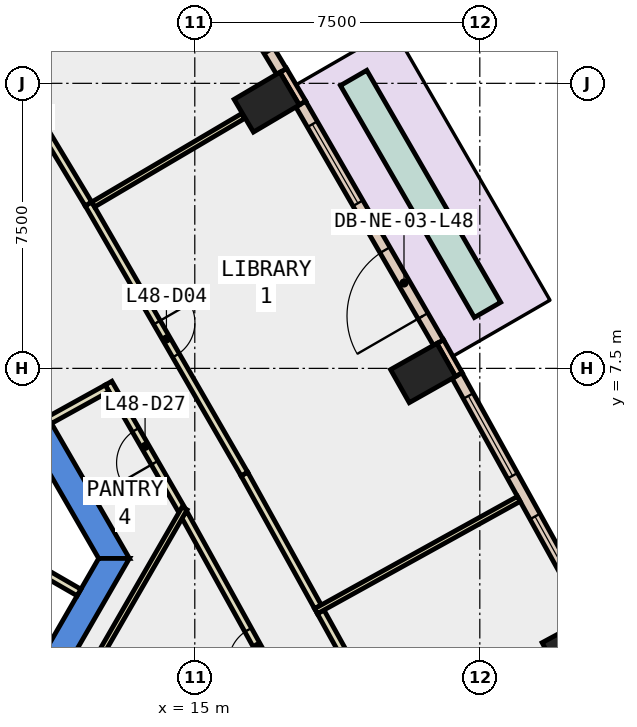
"""IFC4 building model, lengths in metres.
Left out: names, types, materials, properties, quantities, classifications, styles, units other than length and angle.
Written with IfcOpenShell. Run it as: python <this file> out.ifc"""

import sys

from ifc_helpers import new_model, si_unit, direction, frame, frame_2d, origin, origin_2d, place, context, subcontext, project, spatial, polyline, rectangle, outline, extrude, element, fill, save


model = new_model("IFC4")
c1 = context("Model", 3, precision=1e-05, world=origin(), true_north=direction((0.0, 1.0)))
c2 = subcontext(c1, "Body", "Model", "MODEL_VIEW")
j1 = project(units=[si_unit("LENGTHUNIT", "METRE"), si_unit("PLANEANGLEUNIT", "RADIAN")], contexts=[c1])
p1 = place(None, origin())
s1 = spatial("IfcSite", under=j1, at=p1, CompositionType="ELEMENT")
p2 = place(p1, origin())
s2 = spatial("IfcBuilding", under=s1, at=p2, CompositionType="ELEMENT")
p3 = place(p2, frame((0.0, 0.0, 215.0)))
s3 = spatial("IfcBuildingStorey", under=s2, at=p3, CompositionType="ELEMENT", Elevation=215.0)
for number, where, z_axis, x_axis in (
    (1, (24.993, 0.175, -0.4), (0.0, 0.0, 1.0), (-0.474, 0.88, 0.0)),
    (2, (21.007, 7.377, -0.4), (0.0, 0.0, 1.0), (-0.491, 0.871, 0.0)),
    (3, (16.892, 14.504, -0.4), (0.0, 0.0, 1.0), (-0.509, 0.861, 0.0)),
):
    element("IfcColumn", number, at=place(p3, frame(where, z_axis=z_axis, x_axis=x_axis)), inside=s3, PredefinedType="COLUMN", context=c2, shape_type="SweptSolid", body=[
        extrude(rectangle(XDim=1.0, YDim=1.4, at=origin_2d()), origin(), (0.0, 0.0, 1.0), 4.2),
    ])
p4 = place(p3, frame((0.0, 0.0, -0.4)))
e4 = element("IfcWall", 4, at=p4, inside=s3, PredefinedType="SHEAR", context=c2, shape_type="SweptSolid", body=[
    extrude(outline(polyline([(8.084, 11.498), (7.478, 11.148), (12.471, 2.5), (13.279, 2.5), (8.084, 11.498)])), origin(), (0.0, 0.0, 1.0), 4.2),
])
p5 = place(p3, frame((0.0, 0.0, -0.4)))
e5 = element("IfcWall", 5, at=p5, inside=s3, PredefinedType="SHEAR", context=c2, shape_type="SweptSolid", body=[
    extrude(outline(polyline([(6.64, -9.0), (13.279, 2.5), (12.471, 2.5), (6.235, -8.3), (6.64, -9.0)])), origin(), (0.0, 0.0, 1.0), 4.2),
])
p6 = place(p3, frame((21.95, 7.334, 0.0), z_axis=(0.0, 0.0, 1.0), x_axis=(-0.491743606947, 0.87074004446, 0.0)))
e6 = element("IfcWall", 6, at=p6, inside=s3, PredefinedType="STANDARD", context=c2, shape_type="SweptSolid", body=[
    extrude(rectangle(XDim=1.0, YDim=0.2, at=frame_2d((0.5, 0.0))), origin(), (0.0, 0.0, 1.0), 3.8),
])
p7 = place(p3, frame((17.835, 14.481, 0.0), z_axis=(0.0, 0.0, 1.0), x_axis=(-0.508161541526, 0.861261776531, 0.0)))
e7 = element("IfcWall", 7, at=p7, inside=s3, PredefinedType="STANDARD", context=c2, shape_type="SweptSolid", body=[
    extrude(rectangle(XDim=1.0, YDim=0.2, at=frame_2d((0.5, 0.0))), origin(), (0.0, 0.0, 1.0), 3.8),
])
p8 = place(p3, frame((25.411, 0.968, 0.0), z_axis=(0.0, 0.0, 1.0), x_axis=(-0.484163461668, 0.87497756679, 0.0)))
e8 = element("IfcWall", 8, at=p8, inside=s3, PredefinedType="STANDARD", context=c2, shape_type="SweptSolid", body=[
    extrude(rectangle(XDim=7.247, YDim=0.3, at=frame_2d((3.624, 0.0))), origin(), (0.0, 0.0, 1.0), 3.8),
])
p9 = place(p8, frame((0.612, 0.0, 0.9)))
e9 = element("IfcOpeningElement", 9, at=p9, cuts=e8, PredefinedType="OPENING", context=c2, shape_type="SweptSolid", body=[
    extrude(rectangle(XDim=2.4, YDim=2.6, at=frame_2d((1.2, 1.3))), frame((0.0, 0.16, 0.0), z_axis=(0.0, -1.0, 0.0), x_axis=(1.0, 0.0, 0.0)), (0.0, 0.0, 1.0), 0.32),
])
p10 = place(p8, frame((4.235, 0.0, 0.9)))
e10 = element("IfcOpeningElement", 10, at=p10, cuts=e8, PredefinedType="OPENING", context=c2, shape_type="SweptSolid", body=[
    extrude(rectangle(XDim=2.4, YDim=2.6, at=frame_2d((1.2, 1.3))), frame((0.0, 0.16, 0.0), z_axis=(0.0, -1.0, 0.0), x_axis=(1.0, 0.0, 0.0)), (0.0, 0.0, 1.0), 0.32),
])
p11 = place(p3, frame((21.411, 8.177, 0.0), z_axis=(0.0, 0.0, 1.0), x_axis=(-0.499968351115, 0.866043675505, 0.0)))
e11 = element("IfcWall", 11, at=p11, inside=s3, PredefinedType="STANDARD", context=c2, shape_type="SweptSolid", body=[
    extrude(rectangle(XDim=7.248, YDim=0.3, at=frame_2d((3.624, 0.0))), origin(), (0.0, 0.0, 1.0), 3.8),
])
p12 = place(p11, frame((0.812, 0.0, 0.0)))
e12 = element("IfcOpeningElement", 12, at=p12, cuts=e11, PredefinedType="OPENING", context=c2, shape_type="SweptSolid", body=[
    extrude(rectangle(XDim=2.0, YDim=2.4, at=frame_2d((1.0, 1.2))), frame((0.0, 0.16, 0.0), z_axis=(0.0, -1.0, 0.0), x_axis=(1.0, 0.0, 0.0)), (0.0, 0.0, 1.0), 0.32),
])
p13 = place(p11, frame((4.236, 0.0, 0.9)))
e13 = element("IfcOpeningElement", 13, at=p13, cuts=e11, PredefinedType="OPENING", context=c2, shape_type="SweptSolid", body=[
    extrude(rectangle(XDim=2.4, YDim=2.6, at=frame_2d((1.2, 1.3))), frame((0.0, 0.16, 0.0), z_axis=(0.0, -1.0, 0.0), x_axis=(1.0, 0.0, 0.0)), (0.0, 0.0, 1.0), 0.32),
])
p14 = place(p3, frame((17.281, 15.313, 0.0), z_axis=(0.0, 0.0, 1.0), x_axis=(-0.515560283412, 0.856853309597, 0.0)))
e14 = element("IfcWall", 14, at=p14, inside=s3, PredefinedType="STANDARD", context=c2, shape_type="SweptSolid", body=[
    extrude(rectangle(XDim=7.249, YDim=0.3, at=frame_2d((3.624, 0.0))), origin(), (0.0, 0.0, 1.0), 3.8),
])
p15 = place(p14, frame((0.612, 0.0, 0.9)))
e15 = element("IfcOpeningElement", 15, at=p15, cuts=e14, PredefinedType="OPENING", context=c2, shape_type="SweptSolid", body=[
    extrude(rectangle(XDim=2.4, YDim=2.6, at=frame_2d((1.2, 1.3))), frame((0.0, 0.16, 0.0), z_axis=(0.0, -1.0, 0.0), x_axis=(1.0, 0.0, 0.0)), (0.0, 0.0, 1.0), 0.32),
])
p16 = place(p14, frame((4.236, 0.0, 0.9)))
e16 = element("IfcOpeningElement", 16, at=p16, cuts=e14, PredefinedType="OPENING", context=c2, shape_type="SweptSolid", body=[
    extrude(rectangle(XDim=2.4, YDim=2.6, at=frame_2d((1.2, 1.3))), frame((0.0, 0.16, 0.0), z_axis=(0.0, -1.0, 0.0), x_axis=(1.0, 0.0, 0.0)), (0.0, 0.0, 1.0), 0.32),
])
p17 = place(p3, frame((22.703, 9.039, 0.0), z_axis=(0.0, 0.0, 1.0), x_axis=(-0.500036321933, 0.866004432291, 0.0)))
e17 = element("IfcWall", 17, at=p17, inside=s3, PredefinedType="STANDARD", context=c2, shape_type="SweptSolid", body=[
    extrude(rectangle(XDim=7.047, YDim=0.8, at=frame_2d((3.524, 0.0))), origin(), (0.0, 0.0, 1.0), 0.8),
])
p18 = place(p3, frame((14.652, 3.783, 0.0), z_axis=(0.0, 0.0, 1.0), x_axis=(-0.499821427992, 0.866128477837, 0.0)))
e18 = element("IfcWall", 18, at=p18, inside=s3, PredefinedType="PARTITIONING", context=c2, shape_type="SweptSolid", body=[
    extrude(rectangle(XDim=3.844, YDim=0.2, at=frame_2d((1.922, 0.0))), origin(), (0.0, 0.0, 1.0), 3.8),
])
p19 = place(p18, frame((1.421, 0.0, 0.0)))
e19 = element("IfcOpeningElement", 19, at=p19, cuts=e18, PredefinedType="OPENING", context=c2, shape_type="SweptSolid", body=[
    extrude(rectangle(XDim=1.0, YDim=2.1, at=frame_2d((0.5, 1.05))), frame((0.0, 0.11, 0.0), z_axis=(0.0, -1.0, 0.0), x_axis=(1.0, 0.0, 0.0)), (0.0, 0.0, 1.0), 0.22),
])
p20 = place(p3, frame((12.693, 6.976, 0.0), z_axis=(0.0, 0.0, 1.0), x_axis=(-0.874908151187, -0.484288887944, 0.0)))
e20 = element("IfcWall", 20, at=p20, inside=s3, PredefinedType="PARTITIONING", context=c2, shape_type="SweptSolid", body=[
    extrude(rectangle(XDim=1.731, YDim=0.2, at=frame_2d((0.865, 0.0))), origin(), (0.0, 0.0, 1.0), 3.8),
])
p21 = place(p3, frame((18.574, -3.303, 0.0), z_axis=(0.0, 0.0, 1.0), x_axis=(-0.484239190765, 0.874935658279, 0.0)))
e21 = element("IfcWall", 21, at=p21, inside=s3, PredefinedType="PARTITIONING", context=c2, shape_type="SweptSolid", body=[
    extrude(rectangle(XDim=7.963, YDim=0.2, at=frame_2d((3.981, 0.0))), origin(), (0.0, 0.0, 1.0), 3.8),
])
p22 = place(p21, frame((3.482, 0.0, 0.0)))
e22 = element("IfcOpeningElement", 22, at=p22, cuts=e21, PredefinedType="OPENING", context=c2, shape_type="SweptSolid", body=[
    extrude(rectangle(XDim=1.0, YDim=2.1, at=frame_2d((0.5, 1.05))), frame((0.0, 0.11, 0.0), z_axis=(0.0, -1.0, 0.0), x_axis=(1.0, 0.0, 0.0)), (0.0, 0.0, 1.0), 0.22),
])
p23 = place(p3, frame((18.312, 1.094, 0.0), z_axis=(0.0, 0.0, 1.0), x_axis=(0.484328424129, -0.874886265511, 0.0)))
e23 = element("IfcWall", 23, at=p23, inside=s3, PredefinedType="PARTITIONING", context=c2, shape_type="SweptSolid", body=[
    extrude(rectangle(XDim=3.991, YDim=0.2, at=frame_2d((1.996, 0.0))), origin(), (0.0, 0.0, 1.0), 3.8),
])
p24 = place(p3, frame((12.202, 11.828, 0.0), z_axis=(0.0, 0.0, 1.0), x_axis=(0.499919823193, -0.866071688937, 0.0)))
e24 = element("IfcWall", 24, at=p24, inside=s3, PredefinedType="PARTITIONING", context=c2, shape_type="SweptSolid", body=[
    extrude(rectangle(XDim=8.209, YDim=0.2, at=frame_2d((4.104, 0.0))), origin(), (0.0, 0.0, 1.0), 3.8),
])
p25 = place(p24, frame((3.604, 0.0, 0.0)))
e25 = element("IfcOpeningElement", 25, at=p25, cuts=e24, PredefinedType="OPENING", context=c2, shape_type="SweptSolid", body=[
    extrude(rectangle(XDim=1.0, YDim=2.1, at=frame_2d((0.5, 1.05))), frame((0.0, 0.11, 0.0), z_axis=(0.0, -1.0, 0.0), x_axis=(1.0, 0.0, 0.0)), (0.0, 0.0, 1.0), 0.22),
])
p26 = place(p3, frame((16.306, 4.718, 0.0), z_axis=(0.0, 0.0, 1.0), x_axis=(0.484411997038, -0.874839995156, 0.0)))
e26 = element("IfcWall", 26, at=p26, inside=s3, PredefinedType="PARTITIONING", context=c2, shape_type="SweptSolid", body=[
    extrude(rectangle(XDim=3.993, YDim=0.2, at=frame_2d((1.996, 0.0))), origin(), (0.0, 0.0, 1.0), 3.8),
])
p27 = place(p3, frame((8.046, 18.732, 0.0), z_axis=(0.0, 0.0, 1.0), x_axis=(0.515502328211, -0.856888178007, 0.0)))
e27 = element("IfcWall", 27, at=p27, inside=s3, PredefinedType="PARTITIONING", context=c2, shape_type="SweptSolid", body=[
    extrude(rectangle(XDim=8.058, YDim=0.2, at=frame_2d((4.029, 0.0))), origin(), (0.0, 0.0, 1.0), 3.8),
])
p28 = place(p27, frame((3.604, 0.0, 0.0)))
e28 = element("IfcOpeningElement", 28, at=p28, cuts=e27, PredefinedType="OPENING", context=c2, shape_type="SweptSolid", body=[
    extrude(rectangle(XDim=1.0, YDim=2.1, at=frame_2d((0.5, 1.05))), frame((0.0, 0.11, 0.0), z_axis=(0.0, -1.0, 0.0), x_axis=(1.0, 0.0, 0.0)), (0.0, 0.0, 1.0), 0.22),
])
p29 = place(p3, frame((9.615, 2.953, 0.0), z_axis=(0.0, 0.0, 1.0), x_axis=(0.866013897511, -0.50001992892, 0.0)))
e29 = element("IfcWall", 29, at=p29, inside=s3, PredefinedType="PARTITIONING", context=c2, shape_type="SweptSolid", body=[
    extrude(rectangle(XDim=2.7, YDim=0.2, at=frame_2d((1.35, 0.0))), origin(), (0.0, 0.0, 1.0), 3.8),
])
p30 = place(p3, frame((9.779, -4.762, 0.0), z_axis=(0.0, 0.0, 1.0), x_axis=(0.499990552429, 0.866030858274, 0.0)))
e30 = element("IfcWall", 30, at=p30, inside=s3, PredefinedType="PARTITIONING", context=c2, shape_type="SweptSolid", body=[
    extrude(rectangle(XDim=9.906, YDim=0.15, at=frame_2d((4.953, 0.0))), origin(), (0.0, 0.0, 1.0), 3.8),
])
p31 = place(p3, frame((18.189, 1.111, 0.0), z_axis=(0.0, 0.0, 1.0), x_axis=(0.874928335558, 0.484252421405, 0.0)))
e31 = element("IfcWall", 31, at=p31, inside=s3, PredefinedType="PARTITIONING", context=c2, shape_type="SweptSolid", body=[
    extrude(rectangle(XDim=6.1, YDim=0.15, at=frame_2d((3.05, 0.0))), origin(), (0.0, 0.0, 1.0), 3.8),
])
p32 = place(p3, frame((12.326, 11.813, 0.0), z_axis=(0.0, 0.0, 1.0), x_axis=(0.861428100003, 0.507879541353, 0.0)))
e32 = element("IfcWall", 32, at=p32, inside=s3, PredefinedType="PARTITIONING", context=c2, shape_type="SweptSolid", body=[
    extrude(rectangle(XDim=4.58, YDim=0.15, at=frame_2d((2.29, 0.0))), origin(), (0.0, 0.0, 1.0), 3.8),
])
p33 = place(p9, origin())
e33 = element("IfcWindow", 33, at=p33, inside=s3, PartitioningType="SINGLE_PANEL", PredefinedType="WINDOW", context=c2, shape_type="SweptSolid", body=[
    extrude(rectangle(XDim=2.4, YDim=2.6, at=frame_2d((1.2, 1.3))), frame((0.0, 0.03, 0.0), z_axis=(0.0, -1.0, 0.0), x_axis=(1.0, 0.0, 0.0)), (0.0, 0.0, 1.0), 0.06),
])
fill(e9, e33)
p34 = place(p10, origin())
e34 = element("IfcWindow", 34, at=p34, inside=s3, PartitioningType="SINGLE_PANEL", PredefinedType="WINDOW", context=c2, shape_type="SweptSolid", body=[
    extrude(rectangle(XDim=2.4, YDim=2.6, at=frame_2d((1.2, 1.3))), frame((0.0, 0.03, 0.0), z_axis=(0.0, -1.0, 0.0), x_axis=(1.0, 0.0, 0.0)), (0.0, 0.0, 1.0), 0.06),
])
fill(e10, e34)
p35 = place(p12, origin())
e35 = element("IfcDoor", 35, at=p35, inside=s3, OperationType="SLIDING_TO_LEFT", PredefinedType="DOOR", context=c2, shape_type="SweptSolid", body=[
    extrude(rectangle(XDim=2.0, YDim=2.4, at=frame_2d((1.0, 1.2))), frame((0.0, 0.025, 0.0), z_axis=(0.0, -1.0, 0.0), x_axis=(1.0, 0.0, 0.0)), (0.0, 0.0, 1.0), 0.05),
])
fill(e12, e35)
p36 = place(p13, origin())
e36 = element("IfcWindow", 36, at=p36, inside=s3, PartitioningType="SINGLE_PANEL", PredefinedType="WINDOW", context=c2, shape_type="SweptSolid", body=[
    extrude(rectangle(XDim=2.4, YDim=2.6, at=frame_2d((1.2, 1.3))), frame((0.0, 0.03, 0.0), z_axis=(0.0, -1.0, 0.0), x_axis=(1.0, 0.0, 0.0)), (0.0, 0.0, 1.0), 0.06),
])
fill(e13, e36)
p37 = place(p25, origin())
e37 = element("IfcDoor", 37, at=p37, inside=s3, OperationType="SINGLE_SWING_RIGHT", PredefinedType="DOOR", context=c2, shape_type="SweptSolid", body=[
    extrude(rectangle(XDim=1.0, YDim=2.1, at=frame_2d((0.5, 1.05))), frame((0.0, 0.025, 0.0), z_axis=(0.0, -1.0, 0.0), x_axis=(1.0, 0.0, 0.0)), (0.0, 0.0, 1.0), 0.05),
])
fill(e25, e37)
p38 = place(p22, origin())
e38 = element("IfcDoor", 38, at=p38, inside=s3, OperationType="SINGLE_SWING_LEFT", PredefinedType="DOOR", context=c2, shape_type="SweptSolid", body=[
    extrude(rectangle(XDim=1.0, YDim=2.1, at=frame_2d((0.5, 1.05))), frame((0.0, 0.025, 0.0), z_axis=(0.0, -1.0, 0.0), x_axis=(1.0, 0.0, 0.0)), (0.0, 0.0, 1.0), 0.05),
])
fill(e22, e38)
p39 = place(p19, origin())
e39 = element("IfcDoor", 39, at=p39, inside=s3, OperationType="SINGLE_SWING_LEFT", PredefinedType="DOOR", context=c2, shape_type="SweptSolid", body=[
    extrude(rectangle(XDim=1.0, YDim=2.1, at=frame_2d((0.5, 1.05))), frame((0.0, 0.025, 0.0), z_axis=(0.0, -1.0, 0.0), x_axis=(1.0, 0.0, 0.0)), (0.0, 0.0, 1.0), 0.05),
])
fill(e19, e39)
save(model, sys.argv[1])
